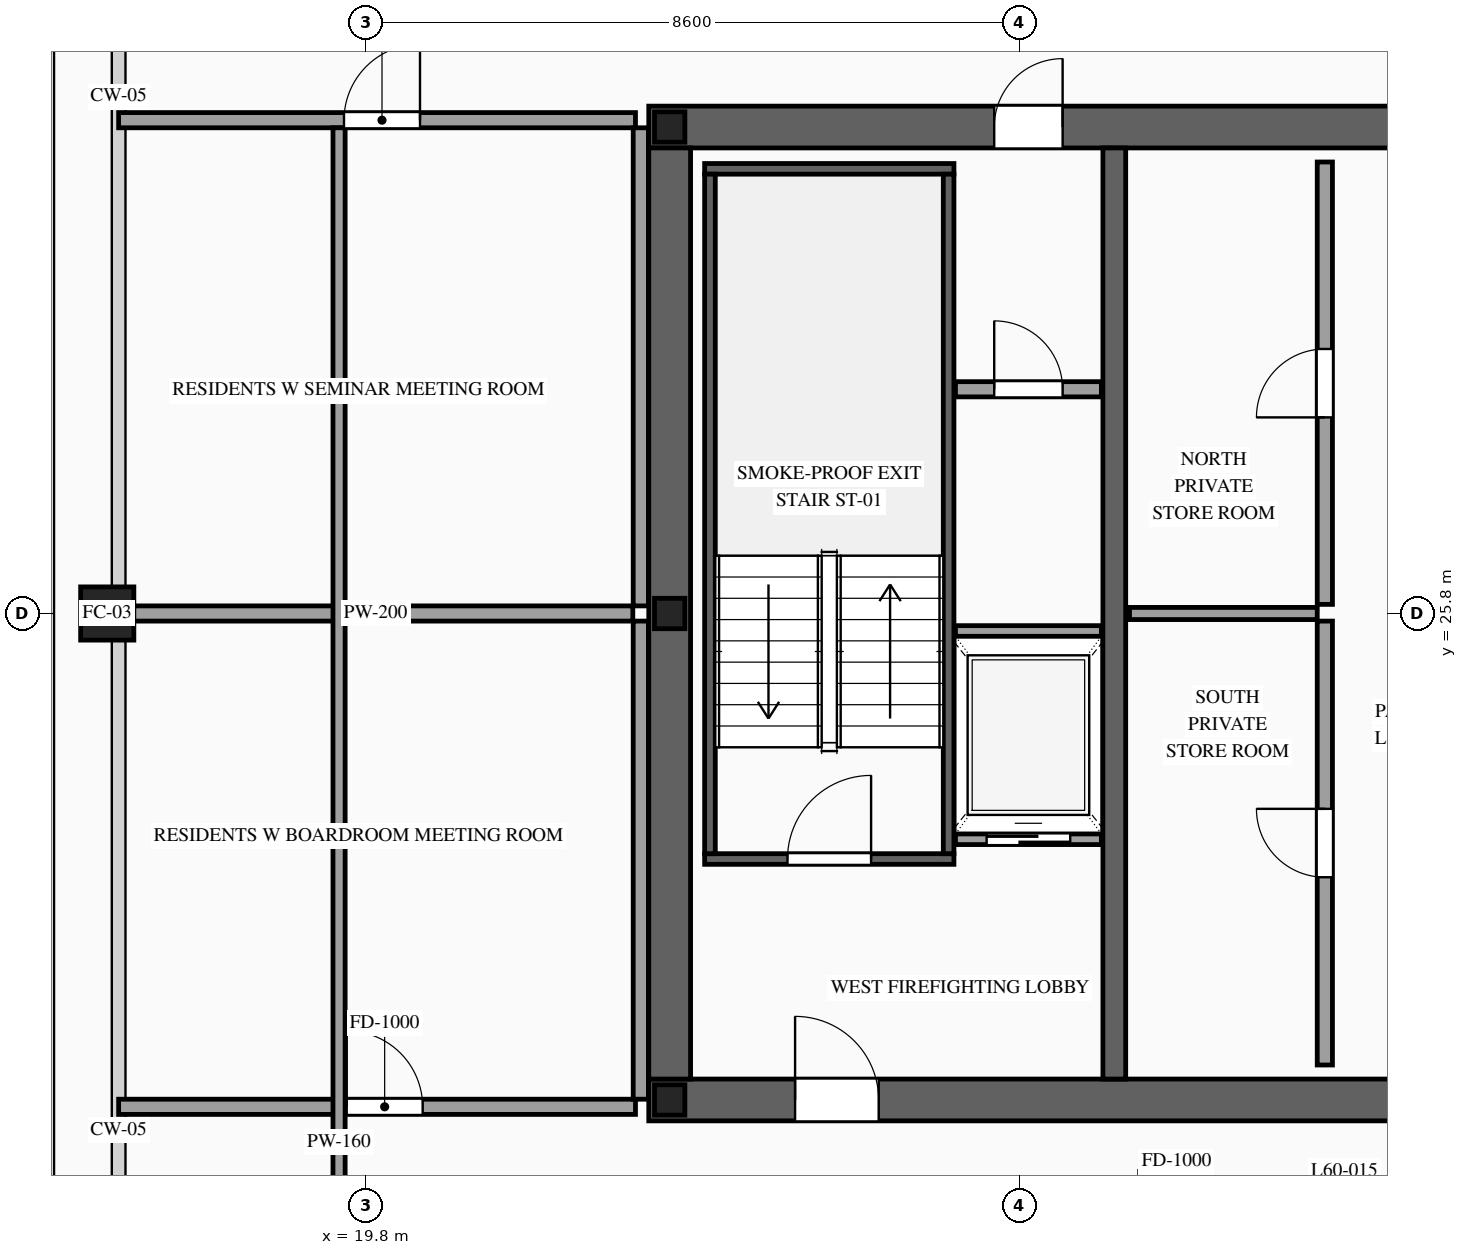
"""IFC4 building model, lengths in metres.
Left out: names, types, materials, properties, quantities, classifications, styles, units other than length and angle.
Written with IfcOpenShell. Run it as: python <this file> out.ifc"""

import sys

from ifc_helpers import new_model, si_unit, direction, frame, frame_2d, origin, origin_2d, place, context, subcontext, project, spatial, rectangle, hollow_rectangle, i_section, extrude, source, transform, mapped, element, fill, save


model = new_model("IFC4")
c1 = context("Model", 3, precision=1e-05, world=origin(), true_north=direction((0.0, 1.0)))
c2 = subcontext(c1, "Body", "Model", "MODEL_VIEW")
j1 = project(units=[si_unit("LENGTHUNIT", "METRE"), si_unit("PLANEANGLEUNIT", "RADIAN")], contexts=[c1])
p1 = place(None, origin())
s1 = spatial("IfcSite", under=j1, at=p1, CompositionType="ELEMENT")
p2 = place(p1, origin())
s2 = spatial("IfcBuilding", under=s1, at=p2, CompositionType="ELEMENT")
p3 = place(p2, frame((0.0, 0.0, 227.6)))
s3 = spatial("IfcBuildingStorey", under=s2, at=p3, CompositionType="ELEMENT", Elevation=227.6)
p4 = place(p3, frame((23.525, 19.4, 0.0), z_axis=(0.0, 0.0, 1.0), x_axis=(1.0, 0.0, 0.0)))
e1 = element("IfcWall", 1, at=p4, inside=s3, PredefinedType="SHEAR", context=c2, shape_type="SweptSolid", body=[
    extrude(rectangle(XDim=26.95, YDim=0.55, at=frame_2d((13.475, 0.0))), origin(), (0.0, 0.0, 1.0), 3.5),
])
p5 = place(p4, frame((1.925, 0.0, 0.0)))
e2 = element("IfcOpeningElement", 2, at=p5, cuts=e1, PredefinedType="OPENING", context=c2, shape_type="SweptSolid", body=[
    extrude(rectangle(XDim=1.1, YDim=2.2, at=frame_2d((0.55, 1.1))), frame((0.0, 0.29, 0.0), z_axis=(0.0, -1.0, 0.0), x_axis=(1.0, 0.0, 0.0)), (0.0, 0.0, 1.0), 0.58),
])
p6 = place(p4, frame((9.825, 0.0, 0.0)))
e3 = element("IfcOpeningElement", 3, at=p6, cuts=e1, PredefinedType="OPENING", context=c2, shape_type="SweptSolid", body=[
    extrude(rectangle(XDim=1.1, YDim=2.2, at=frame_2d((0.55, 1.1))), frame((0.0, 0.29, 0.0), z_axis=(0.0, -1.0, 0.0), x_axis=(1.0, 0.0, 0.0)), (0.0, 0.0, 1.0), 0.58),
])
p7 = place(p4, frame((23.025, 0.0, 0.0)))
e4 = element("IfcOpeningElement", 4, at=p7, cuts=e1, PredefinedType="OPENING", context=c2, shape_type="SweptSolid", body=[
    extrude(rectangle(XDim=1.1, YDim=2.2, at=frame_2d((0.55, 1.1))), frame((0.0, 0.29, 0.0), z_axis=(0.0, -1.0, 0.0), x_axis=(1.0, 0.0, 0.0)), (0.0, 0.0, 1.0), 0.58),
])
p8 = place(p4, frame((19.645, 0.0, 0.0)))
e5 = element("IfcOpeningElement", 5, at=p8, cuts=e1, PredefinedType="OPENING", context=c2, shape_type="SweptSolid", body=[
    extrude(rectangle(XDim=0.9, YDim=2.15, at=frame_2d((0.45, 1.075))), frame((0.0, 0.29, 0.0), z_axis=(0.0, -1.0, 0.0), x_axis=(1.0, 0.0, 0.0)), (0.0, 0.0, 1.0), 0.58),
])
p9 = place(p4, frame((18.205, 0.0, 0.0)))
e6 = element("IfcOpeningElement", 6, at=p9, cuts=e1, PredefinedType="OPENING", context=c2, shape_type="SweptSolid", body=[
    extrude(rectangle(XDim=0.9, YDim=2.15, at=frame_2d((0.45, 1.075))), frame((0.0, 0.29, 0.0), z_axis=(0.0, -1.0, 0.0), x_axis=(1.0, 0.0, 0.0)), (0.0, 0.0, 1.0), 0.58),
])
p10 = place(p3, frame((23.525, 32.2, 0.0), z_axis=(0.0, 0.0, 1.0), x_axis=(1.0, 0.0, 0.0)))
e7 = element("IfcWall", 7, at=p10, inside=s3, PredefinedType="SHEAR", context=c2, shape_type="SweptSolid", body=[
    extrude(rectangle(XDim=26.95, YDim=0.55, at=frame_2d((13.475, 0.0))), origin(), (0.0, 0.0, 1.0), 3.5),
])
p11 = place(p10, frame((4.545, 0.0, 0.0)))
e8 = element("IfcOpeningElement", 8, at=p11, cuts=e7, PredefinedType="OPENING", context=c2, shape_type="SweptSolid", body=[
    extrude(rectangle(XDim=0.9, YDim=2.15, at=frame_2d((0.45, 1.075))), frame((0.0, 0.29, 0.0), z_axis=(0.0, -1.0, 0.0), x_axis=(1.0, 0.0, 0.0)), (0.0, 0.0, 1.0), 0.58),
])
p12 = place(p10, frame((9.825, 0.0, 0.0)))
e9 = element("IfcOpeningElement", 9, at=p12, cuts=e7, PredefinedType="OPENING", context=c2, shape_type="SweptSolid", body=[
    extrude(rectangle(XDim=1.1, YDim=2.2, at=frame_2d((0.55, 1.1))), frame((0.0, 0.29, 0.0), z_axis=(0.0, -1.0, 0.0), x_axis=(1.0, 0.0, 0.0)), (0.0, 0.0, 1.0), 0.58),
])
p13 = place(p10, frame((15.675, 0.0, 0.0)))
e10 = element("IfcOpeningElement", 10, at=p13, cuts=e7, PredefinedType="OPENING", context=c2, shape_type="SweptSolid", body=[
    extrude(rectangle(XDim=1.1, YDim=2.2, at=frame_2d((0.55, 1.1))), frame((0.0, 0.29, 0.0), z_axis=(0.0, -1.0, 0.0), x_axis=(1.0, 0.0, 0.0)), (0.0, 0.0, 1.0), 0.58),
])
p14 = place(p10, frame((19.645, 0.0, 0.0)))
e11 = element("IfcOpeningElement", 11, at=p14, cuts=e7, PredefinedType="OPENING", context=c2, shape_type="SweptSolid", body=[
    extrude(rectangle(XDim=0.9, YDim=2.15, at=frame_2d((0.45, 1.075))), frame((0.0, 0.29, 0.0), z_axis=(0.0, -1.0, 0.0), x_axis=(1.0, 0.0, 0.0)), (0.0, 0.0, 1.0), 0.58),
])
m1 = source(origin(), c2, "Body", "SweptSolid", [
    extrude(rectangle(XDim=12.25, YDim=0.55, at=frame_2d((6.125, 0.0))), origin(), (0.0, 0.0, 1.0), 3.5),
])
p15 = place(p3, frame((23.8, 19.675, 0.0), z_axis=(0.0, 0.0, 1.0), x_axis=(0.0, 1.0, 0.0)))
e12 = element("IfcWall", 12, at=p15, inside=s3, PredefinedType="SHEAR", context=c2, shape_type="MappedRepresentation", body=[
    mapped(m1, transform((0.0, 0.0, 0.0), scale=1.0)),
])
m2 = source(origin(), c2, "Body", "SweptSolid", [
    extrude(rectangle(XDim=12.25, YDim=0.3, at=frame_2d((6.125, 0.0))), origin(), (0.0, 0.0, 1.0), 3.5),
])
p16 = place(p3, frame((29.65, 19.675, 0.0), z_axis=(0.0, 0.0, 1.0), x_axis=(0.0, 1.0, 0.0)))
e13 = element("IfcWall", 13, at=p16, inside=s3, PredefinedType="SOLIDWALL", context=c2, shape_type="MappedRepresentation", body=[
    mapped(m2, transform((0.0, 0.0, 0.0), scale=1.0)),
])
m3 = source(origin(), c2, "Body", "SweptSolid", [
    extrude(i_section(OverallWidth=0.4, OverallDepth=0.4, WebThickness=0.013, FlangeThickness=0.021, at=origin_2d()), origin(), (0.0, 0.0, 1.0), 3.5),
])
for number, where, z_axis, x_axis in (
    (14, (23.8, 19.4, 0.0), (0.0, 0.0, 1.0), (1.0, 0.0, 0.0)),
    (15, (23.8, 25.8, 0.0), (0.0, 0.0, 1.0), (1.0, 0.0, 0.0)),
    (16, (23.8, 32.2, 0.0), (0.0, 0.0, 1.0), (1.0, 0.0, 0.0)),
):
    element("IfcColumn", number, at=place(p3, frame(where, z_axis=z_axis, x_axis=x_axis)), inside=s3, PredefinedType="COLUMN", context=c2, shape_type="MappedRepresentation", body=[
        mapped(m3, transform((0.0, 0.0, 0.0), scale=1.0)),
    ])
m4 = source(origin(), c2, "Body", "SweptSolid", [
    extrude(hollow_rectangle(XDim=0.7, YDim=0.7, WallThickness=0.032, at=origin_2d()), origin(), (0.0, 0.0, 1.0), 3.5),
])
p17 = place(p3, frame((16.4, 25.8, 0.0), z_axis=(0.0, 0.0, 1.0), x_axis=(1.0, 0.0, 0.0)))
e17 = element("IfcColumn", 17, at=p17, inside=s3, PredefinedType="COLUMN", context=c2, shape_type="MappedRepresentation", body=[
    mapped(m4, transform((0.0, 0.0, 0.0), scale=1.0)),
])
p18 = place(p3, frame((27.56, 22.83, 0.0), z_axis=(0.0, 0.0, 1.0), x_axis=(1.0, 0.0, 0.0)))
e18 = element("IfcWall", 18, at=p18, inside=s3, PredefinedType="SOLIDWALL", context=c2, shape_type="SweptSolid", body=[
    extrude(rectangle(XDim=1.92, YDim=0.14, at=frame_2d((0.96, 0.0))), origin(), (0.0, 0.0, 1.0), 3.28),
])
p19 = place(p18, frame((0.41, 0.0, 0.0)))
e19 = element("IfcOpeningElement", 19, at=p19, cuts=e18, PredefinedType="OPENING", context=c2, shape_type="SweptSolid", body=[
    extrude(rectangle(XDim=1.1, YDim=2.2, at=frame_2d((0.55, 1.1))), frame((0.0, 0.085, 0.0), z_axis=(0.0, -1.0, 0.0), x_axis=(1.0, 0.0, 0.0)), (0.0, 0.0, 1.0), 0.17),
])
m5 = source(origin(), c2, "Body", "SweptSolid", [
    extrude(rectangle(XDim=1.92, YDim=0.14, at=frame_2d((0.96, 0.0))), origin(), (0.0, 0.0, 1.0), 3.28),
])
p20 = place(p3, frame((27.56, 25.57, 0.0), z_axis=(0.0, 0.0, 1.0), x_axis=(1.0, 0.0, 0.0)))
e20 = element("IfcWall", 20, at=p20, inside=s3, PredefinedType="SOLIDWALL", context=c2, shape_type="MappedRepresentation", body=[
    mapped(m5, transform((0.0, 0.0, 0.0), scale=1.0)),
])
p21 = place(p3, frame((24.26, 22.57, 0.0), z_axis=(0.0, 0.0, 1.0), x_axis=(1.0, 0.0, 0.0)))
e21 = element("IfcWall", 21, at=p21, inside=s3, PredefinedType="SOLIDWALL", context=c2, shape_type="SweptSolid", body=[
    extrude(rectangle(XDim=3.28, YDim=0.14, at=frame_2d((1.64, 0.0))), origin(), (0.0, 0.0, 1.0), 3.28),
])
p22 = place(p21, frame((1.09, 0.0, 0.0)))
e22 = element("IfcOpeningElement", 22, at=p22, cuts=e21, PredefinedType="OPENING", context=c2, shape_type="SweptSolid", body=[
    extrude(rectangle(XDim=1.1, YDim=2.2, at=frame_2d((0.55, 1.1))), frame((0.0, 0.085, 0.0), z_axis=(0.0, -1.0, 0.0), x_axis=(1.0, 0.0, 0.0)), (0.0, 0.0, 1.0), 0.17),
])
m6 = source(origin(), c2, "Body", "SweptSolid", [
    extrude(rectangle(XDim=3.28, YDim=0.14, at=frame_2d((1.64, 0.0))), origin(), (0.0, 0.0, 1.0), 3.28),
])
p23 = place(p3, frame((24.26, 31.65, 0.0), z_axis=(0.0, 0.0, 1.0), x_axis=(1.0, 0.0, 0.0)))
e23 = element("IfcWall", 23, at=p23, inside=s3, PredefinedType="SOLIDWALL", context=c2, shape_type="MappedRepresentation", body=[
    mapped(m6, transform((0.0, 0.0, 0.0), scale=1.0)),
])
m7 = source(origin(), c2, "Body", "SweptSolid", [
    extrude(rectangle(XDim=8.94, YDim=0.14, at=frame_2d((4.47, 0.0))), origin(), (0.0, 0.0, 1.0), 3.28),
])
for number, where, z_axis, x_axis in (
    (24, (24.33, 22.64, 0.0), (0.0, 0.0, 1.0), (0.0, 1.0, 0.0)),
    (25, (27.47, 22.64, 0.0), (0.0, 0.0, 1.0), (0.0, 1.0, 0.0)),
):
    element("IfcWall", number, at=place(p3, frame(where, z_axis=z_axis, x_axis=x_axis)), inside=s3, PredefinedType="SOLIDWALL", context=c2, shape_type="MappedRepresentation", body=[
        mapped(m7, transform((0.0, 0.0, 0.0), scale=1.0)),
    ])
p24 = place(p3, frame((27.56, 28.75, 0.0), z_axis=(0.0, 0.0, 1.0), x_axis=(1.0, 0.0, 0.0)))
e26 = element("IfcWall", 26, at=p24, inside=s3, PredefinedType="PARTITIONING", context=c2, shape_type="SweptSolid", body=[
    extrude(rectangle(XDim=1.92, YDim=0.2, at=frame_2d((0.96, 0.0))), origin(), (0.0, 0.0, 1.0), 3.28),
])
p25 = place(p24, frame((0.51, 0.0, 0.0)))
e27 = element("IfcOpeningElement", 27, at=p25, cuts=e26, PredefinedType="OPENING", context=c2, shape_type="SweptSolid", body=[
    extrude(rectangle(XDim=0.9, YDim=2.15, at=frame_2d((0.45, 1.075))), frame((0.0, 0.115, 0.0), z_axis=(0.0, -1.0, 0.0), x_axis=(1.0, 0.0, 0.0)), (0.0, 0.0, 1.0), 0.23),
])
p26 = place(p3, frame((32.42, 19.86, 0.0), z_axis=(0.0, 0.0, 1.0), x_axis=(0.0, 1.0, 0.0)))
e28 = element("IfcWall", 28, at=p26, inside=s3, PredefinedType="PARTITIONING", context=c2, shape_type="SweptSolid", body=[
    extrude(rectangle(XDim=5.84, YDim=0.2, at=frame_2d((2.92, 0.0))), origin(), (0.0, 0.0, 1.0), 3.28),
])
p27 = place(p26, frame((2.47, 0.0, 0.0)))
e29 = element("IfcOpeningElement", 29, at=p27, cuts=e28, PredefinedType="OPENING", context=c2, shape_type="SweptSolid", body=[
    extrude(rectangle(XDim=0.9, YDim=2.15, at=frame_2d((0.45, 1.075))), frame((0.0, 0.115, 0.0), z_axis=(0.0, -1.0, 0.0), x_axis=(1.0, 0.0, 0.0)), (0.0, 0.0, 1.0), 0.23),
])
p28 = place(p3, frame((32.42, 25.92, 0.0), z_axis=(0.0, 0.0, 1.0), x_axis=(0.0, 1.0, 0.0)))
e30 = element("IfcWall", 30, at=p28, inside=s3, PredefinedType="PARTITIONING", context=c2, shape_type="SweptSolid", body=[
    extrude(rectangle(XDim=5.82, YDim=0.2, at=frame_2d((2.91, 0.0))), origin(), (0.0, 0.0, 1.0), 3.28),
])
p29 = place(p28, frame((2.46, 0.0, 0.0)))
e31 = element("IfcOpeningElement", 31, at=p29, cuts=e30, PredefinedType="OPENING", context=c2, shape_type="SweptSolid", body=[
    extrude(rectangle(XDim=0.9, YDim=2.15, at=frame_2d((0.45, 1.075))), frame((0.0, 0.115, 0.0), z_axis=(0.0, -1.0, 0.0), x_axis=(1.0, 0.0, 0.0)), (0.0, 0.0, 1.0), 0.23),
])
m8 = source(origin(), c2, "Body", "SweptSolid", [
    extrude(rectangle(XDim=2.47, YDim=0.16, at=frame_2d((1.235, 0.0))), origin(), (0.0, 0.0, 1.0), 3.28),
])
p30 = place(p3, frame((29.85, 25.8, 0.0), z_axis=(0.0, 0.0, 1.0), x_axis=(1.0, 0.0, 0.0)))
e32 = element("IfcWall", 32, at=p30, inside=s3, PredefinedType="PARTITIONING", context=c2, shape_type="MappedRepresentation", body=[
    mapped(m8, transform((0.0, 0.0, 0.0), scale=1.0)),
])
p31 = place(p3, frame((16.55, 19.31, 0.0), z_axis=(0.0, 0.0, 1.0), x_axis=(1.0, 0.0, 0.0)))
e33 = element("IfcWall", 33, at=p31, inside=s3, PredefinedType="PARTITIONING", context=c2, shape_type="SweptSolid", body=[
    extrude(rectangle(XDim=6.8, YDim=0.2, at=frame_2d((3.4, 0.0))), origin(), (0.0, 0.0, 1.0), 2.825),
])
p32 = place(p31, frame((3.0, 0.0, 0.0)))
e34 = element("IfcOpeningElement", 34, at=p32, cuts=e33, PredefinedType="OPENING", context=c2, shape_type="SweptSolid", body=[
    extrude(rectangle(XDim=1.0, YDim=2.2, at=frame_2d((0.5, 1.1))), frame((0.0, 0.115, 0.0), z_axis=(0.0, -1.0, 0.0), x_axis=(1.0, 0.0, 0.0)), (0.0, 0.0, 1.0), 0.23),
])
m9 = source(origin(), c2, "Body", "SweptSolid", [
    extrude(rectangle(XDim=6.765, YDim=0.2, at=frame_2d((3.382, 0.0))), origin(), (0.0, 0.0, 1.0), 2.787),
])
p33 = place(p3, frame((16.55, 25.8, 0.0), z_axis=(0.0, 0.0, 1.0), x_axis=(1.0, 0.0, 0.0)))
e35 = element("IfcWall", 35, at=p33, inside=s3, PredefinedType="PARTITIONING", context=c2, shape_type="MappedRepresentation", body=[
    mapped(m9, transform((0.0, 0.0, 0.0), scale=1.0)),
])
m10 = source(origin(), c2, "Body", "SweptSolid", [
    extrude(rectangle(XDim=6.29, YDim=0.2, at=frame_2d((3.145, 0.0))), origin(), (0.0, 0.0, 1.0), 3.28),
])
p34 = place(p3, frame((23.42, 19.41, 0.0), z_axis=(0.0, 0.0, 1.0), x_axis=(0.0, 1.0, 0.0)))
e36 = element("IfcWall", 36, at=p34, inside=s3, PredefinedType="PARTITIONING", context=c2, shape_type="MappedRepresentation", body=[
    mapped(m10, transform((0.0, 0.0, 0.0), scale=1.0)),
])
p35 = place(p3, frame((16.55, 32.29, 0.0), z_axis=(0.0, 0.0, 1.0), x_axis=(1.0, 0.0, 0.0)))
e37 = element("IfcWall", 37, at=p35, inside=s3, PredefinedType="PARTITIONING", context=c2, shape_type="SweptSolid", body=[
    extrude(rectangle(XDim=6.8, YDim=0.2, at=frame_2d((3.4, 0.0))), origin(), (0.0, 0.0, 1.0), 2.825),
])
p36 = place(p35, frame((2.965, 0.0, 0.0)))
e38 = element("IfcOpeningElement", 38, at=p36, cuts=e37, PredefinedType="OPENING", context=c2, shape_type="SweptSolid", body=[
    extrude(rectangle(XDim=1.0, YDim=2.2, at=frame_2d((0.5, 1.1))), frame((0.0, 0.115, 0.0), z_axis=(0.0, -1.0, 0.0), x_axis=(1.0, 0.0, 0.0)), (0.0, 0.0, 1.0), 0.23),
])
m11 = source(origin(), c2, "Body", "SweptSolid", [
    extrude(rectangle(XDim=26.69, YDim=0.16, at=frame_2d((13.345, 0.0))), origin(), (0.0, 0.0, 1.0), 3.28),
])
p37 = place(p3, frame((19.45, 5.5, 0.0), z_axis=(0.0, 0.0, 1.0), x_axis=(0.0, 1.0, 0.0)))
e39 = element("IfcWall", 39, at=p37, inside=s3, PredefinedType="PARTITIONING", context=c2, shape_type="MappedRepresentation", body=[
    mapped(m11, transform((0.0, 0.0, 0.0), scale=1.0)),
])
p38 = place(p3, frame((23.42, 25.9, 0.0), z_axis=(0.0, 0.0, 1.0), x_axis=(0.0, 1.0, 0.0)))
e40 = element("IfcWall", 40, at=p38, inside=s3, PredefinedType="PARTITIONING", context=c2, shape_type="MappedRepresentation", body=[
    mapped(m10, transform((0.0, 0.0, 0.0), scale=1.0)),
])
m12 = source(origin(), c2, "Body", "SweptSolid", [
    extrude(rectangle(XDim=1.1, YDim=2.2, at=frame_2d((0.55, 1.1))), frame((0.0, 0.025, 0.0), z_axis=(0.0, -1.0, 0.0), x_axis=(1.0, 0.0, 0.0)), (0.0, 0.0, 1.0), 0.05),
])
p39 = place(p19, origin())
e41 = element("IfcDoor", 41, at=p39, inside=s3, OperationType="SLIDING_TO_LEFT", PredefinedType="DOOR", context=c2, shape_type="MappedRepresentation", body=[
    mapped(m12, transform((0.0, 0.0, 0.0), scale=1.0)),
])
fill(e19, e41)
m13 = source(origin(), c2, "Body", "SweptSolid", [
    extrude(rectangle(XDim=1.1, YDim=2.2, at=frame_2d((0.55, 1.1))), frame((0.0, 0.025, 0.0), z_axis=(0.0, -1.0, 0.0), x_axis=(1.0, 0.0, 0.0)), (0.0, 0.0, 1.0), 0.05),
])
p40 = place(p22, origin())
e42 = element("IfcDoor", 42, at=p40, inside=s3, OperationType="SINGLE_SWING_RIGHT", PredefinedType="DOOR", context=c2, shape_type="MappedRepresentation", body=[
    mapped(m13, transform((0.0, 0.0, 0.0), scale=1.0)),
])
fill(e22, e42)
p41 = place(p5, origin())
e43 = element("IfcDoor", 43, at=p41, inside=s3, OperationType="SINGLE_SWING_LEFT", PredefinedType="DOOR", context=c2, shape_type="MappedRepresentation", body=[
    mapped(m13, transform((0.0, 0.0, 0.0), scale=1.0)),
])
fill(e2, e43)
m14 = source(origin(), c2, "Body", "SweptSolid", [
    extrude(rectangle(XDim=0.9, YDim=2.15, at=frame_2d((0.45, 1.075))), frame((0.0, 0.025, 0.0), z_axis=(0.0, -1.0, 0.0), x_axis=(1.0, 0.0, 0.0)), (0.0, 0.0, 1.0), 0.05),
])
p42 = place(p11, origin())
e44 = element("IfcDoor", 44, at=p42, inside=s3, OperationType="SINGLE_SWING_RIGHT", PredefinedType="DOOR", context=c2, shape_type="MappedRepresentation", body=[
    mapped(m14, transform((0.0, 0.0, 0.0), scale=1.0)),
])
fill(e8, e44)
p43 = place(p25, origin())
e45 = element("IfcDoor", 45, at=p43, inside=s3, OperationType="SINGLE_SWING_LEFT", PredefinedType="DOOR", context=c2, shape_type="MappedRepresentation", body=[
    mapped(m14, transform((0.0, 0.0, 0.0), scale=1.0)),
])
fill(e27, e45)
p44 = place(p27, origin())
e46 = element("IfcDoor", 46, at=p44, inside=s3, OperationType="SINGLE_SWING_RIGHT", PredefinedType="DOOR", context=c2, shape_type="MappedRepresentation", body=[
    mapped(m14, transform((0.0, 0.0, 0.0), scale=1.0)),
])
fill(e29, e46)
p45 = place(p29, origin())
e47 = element("IfcDoor", 47, at=p45, inside=s3, OperationType="SINGLE_SWING_LEFT", PredefinedType="DOOR", context=c2, shape_type="MappedRepresentation", body=[
    mapped(m14, transform((0.0, 0.0, 0.0), scale=1.0)),
])
fill(e31, e47)
m15 = source(origin(), c2, "Body", "SweptSolid", [
    extrude(rectangle(XDim=1.0, YDim=2.2, at=frame_2d((0.5, 1.1))), frame((0.0, 0.025, 0.0), z_axis=(0.0, -1.0, 0.0), x_axis=(1.0, 0.0, 0.0)), (0.0, 0.0, 1.0), 0.05),
])
p46 = place(p32, origin())
e48 = element("IfcDoor", 48, at=p46, inside=s3, OperationType="SINGLE_SWING_LEFT", PredefinedType="DOOR", context=c2, shape_type="MappedRepresentation", body=[
    mapped(m15, transform((0.0, 0.0, 0.0), scale=1.0)),
])
fill(e34, e48)
p47 = place(p36, origin())
e49 = element("IfcDoor", 49, at=p47, inside=s3, OperationType="SINGLE_SWING_RIGHT", PredefinedType="DOOR", context=c2, shape_type="MappedRepresentation", body=[
    mapped(m15, transform((0.0, 0.0, 0.0), scale=1.0)),
])
fill(e38, e49)
save(model, sys.argv[1])
